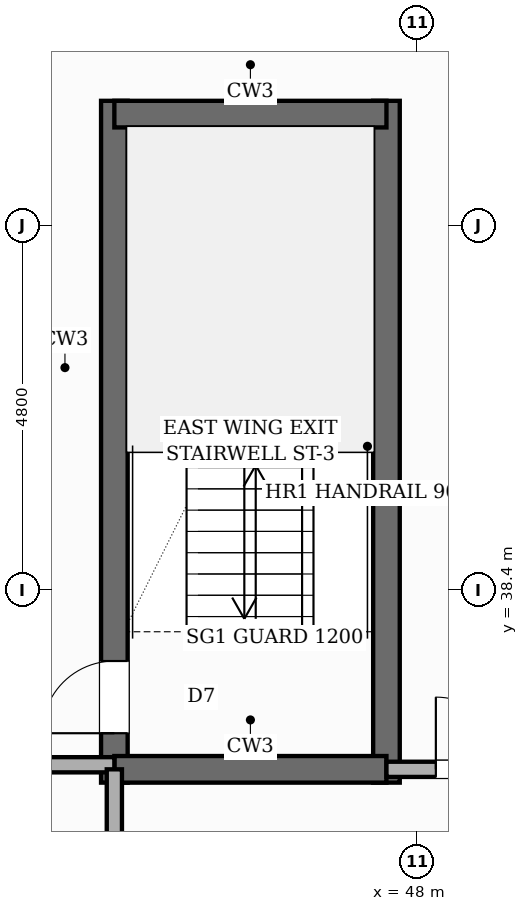
"""IFC4 building model, lengths in metres.
Left out: names, types, materials, properties, quantities, classifications, styles, units other than length and angle.
Written with IfcOpenShell. Run it as: python <this file> out.ifc"""

import sys

from ifc_helpers import new_model, si_unit, direction, frame, frame_2d, origin, place, context, subcontext, project, spatial, rectangle, extrude, element, fill, save


model = new_model("IFC4")
c1 = context("Model", 3, precision=1e-05, world=origin(), true_north=direction((0.0, 1.0)))
c2 = subcontext(c1, "Body", "Model", "MODEL_VIEW")
j1 = project(units=[si_unit("LENGTHUNIT", "METRE"), si_unit("PLANEANGLEUNIT", "RADIAN")], contexts=[c1])
p1 = place(None, origin())
s1 = spatial("IfcSite", under=j1, at=p1, CompositionType="ELEMENT")
p2 = place(p1, origin())
s2 = spatial("IfcBuilding", under=s1, at=p2, CompositionType="ELEMENT")
p3 = place(p2, frame((0.0, 0.0, 28.6)))
s3 = spatial("IfcBuildingStorey", under=s2, at=p3, CompositionType="ELEMENT", Elevation=28.6)
p4 = place(p3, frame((44.02, 35.865, 0.0), z_axis=(0.0, 0.0, 1.0), x_axis=(0.0, 1.0, 0.0)))
e1 = element("IfcWall", 1, at=p4, inside=s3, PredefinedType="SHEAR", context=c2, shape_type="SweptSolid", body=[
    extrude(rectangle(XDim=8.97, YDim=0.35, at=frame_2d((4.485, 0.0))), origin(), (0.0, 0.0, 1.0), 3.6),
])
p5 = place(p4, frame((0.65, 0.0, 0.0)))
e2 = element("IfcOpeningElement", 2, at=p5, cuts=e1, PredefinedType="OPENING", context=c2, shape_type="SweptSolid", body=[
    extrude(rectangle(XDim=0.95, YDim=2.1, at=frame_2d((0.475, 1.05))), frame((0.0, 0.185, 0.0), z_axis=(0.0, -1.0, 0.0), x_axis=(1.0, 0.0, 0.0)), (0.0, 0.0, 1.0), 0.37),
])
p6 = place(p3, frame((47.6, 35.865, 0.0), z_axis=(0.0, 0.0, 1.0), x_axis=(0.0, 1.0, 0.0)))
e3 = element("IfcWall", 3, at=p6, inside=s3, PredefinedType="SHEAR", context=c2, shape_type="SweptSolid", body=[
    extrude(rectangle(XDim=8.97, YDim=0.35, at=frame_2d((4.485, 0.0))), origin(), (0.0, 0.0, 1.0), 3.6),
])
for number, where, z_axis, x_axis in (
    (4, (44.02, 36.04, 0.0), (0.0, 0.0, 1.0), (1.0, 0.0, 0.0)),
    (5, (44.02, 44.66, 0.0), (0.0, 0.0, 1.0), (1.0, 0.0, 0.0)),
):
    element("IfcWall", number, at=place(p3, frame(where, z_axis=z_axis, x_axis=x_axis)), inside=s3, PredefinedType="SHEAR", context=c2, shape_type="SweptSolid", body=[
        extrude(rectangle(XDim=3.58, YDim=0.35, at=frame_2d((1.79, 0.0))), origin(), (0.0, 0.0, 1.0), 3.6),
    ])
p7 = place(p3, frame((22.75, 36.1, 0.0), z_axis=(0.0, 0.0, 1.0), x_axis=(1.0, 0.0, 0.0)))
e6 = element("IfcWall", 6, at=p7, inside=s3, PredefinedType="PARTITIONING", context=c2, shape_type="SweptSolid", body=[
    extrude(rectangle(XDim=21.27, YDim=0.2, at=frame_2d((10.635, 0.0))), origin(), (0.0, 0.0, 1.0), 3.35),
])
p8 = place(p7, frame((1.628, 0.0, 0.0)))
e7 = element("IfcOpeningElement", 7, at=p8, cuts=e6, PredefinedType="OPENING", context=c2, shape_type="SweptSolid", body=[
    extrude(rectangle(XDim=0.98, YDim=2.18, at=frame_2d((0.49, 1.09))), frame((0.0, 0.11, 0.0), z_axis=(0.0, -1.0, 0.0), x_axis=(1.0, 0.0, 0.0)), (0.0, 0.0, 1.0), 0.22),
])
p9 = place(p7, frame((14.725, 0.0, 0.0)))
e8 = element("IfcOpeningElement", 8, at=p9, cuts=e6, PredefinedType="OPENING", context=c2, shape_type="SweptSolid", body=[
    extrude(rectangle(XDim=0.98, YDim=2.18, at=frame_2d((0.49, 1.09))), frame((0.0, 0.11, 0.0), z_axis=(0.0, -1.0, 0.0), x_axis=(1.0, 0.0, 0.0)), (0.0, 0.0, 1.0), 0.22),
])
p10 = place(p3, frame((47.6, 36.04, 0.0), z_axis=(0.0, 0.0, 1.0), x_axis=(1.0, 0.0, 0.0)))
e9 = element("IfcWall", 9, at=p10, inside=s3, PredefinedType="PARTITIONING", context=c2, shape_type="SweptSolid", body=[
    extrude(rectangle(XDim=2.3, YDim=0.2, at=frame_2d((1.15, 0.0))), origin(), (0.0, 0.0, 1.0), 3.35),
])
p11 = place(p10, frame((0.65, 0.0, 0.0)))
e10 = element("IfcOpeningElement", 10, at=p11, cuts=e9, PredefinedType="OPENING", context=c2, shape_type="SweptSolid", body=[
    extrude(rectangle(XDim=0.95, YDim=2.15, at=frame_2d((0.475, 1.075))), frame((0.0, 0.11, 0.0), z_axis=(0.0, -1.0, 0.0), x_axis=(1.0, 0.0, 0.0)), (0.0, 0.0, 1.0), 0.22),
])
p12 = place(p3, frame((44.02, 29.12, 0.0), z_axis=(0.0, 0.0, 1.0), x_axis=(0.0, 1.0, 0.0)))
e11 = element("IfcWall", 11, at=p12, inside=s3, PredefinedType="SOLIDWALL", context=c2, shape_type="SweptSolid", body=[
    extrude(rectangle(XDim=6.92, YDim=0.2, at=frame_2d((3.46, 0.0))), origin(), (0.0, 0.0, 1.0), 3.35),
])
p13 = place(p5, origin())
e12 = element("IfcDoor", 12, at=p13, inside=s3, OperationType="SINGLE_SWING_LEFT", PredefinedType="DOOR", context=c2, shape_type="SweptSolid", body=[
    extrude(rectangle(XDim=0.95, YDim=2.1, at=frame_2d((0.475, 1.05))), frame((0.0, 0.025, 0.0), z_axis=(0.0, -1.0, 0.0), x_axis=(1.0, 0.0, 0.0)), (0.0, 0.0, 1.0), 0.05),
])
fill(e2, e12)
p14 = place(p11, origin())
e13 = element("IfcDoor", 13, at=p14, inside=s3, OperationType="SINGLE_SWING_LEFT", PredefinedType="DOOR", context=c2, shape_type="SweptSolid", body=[
    extrude(rectangle(XDim=0.95, YDim=2.15, at=frame_2d((0.475, 1.075))), frame((0.0, 0.025, 0.0), z_axis=(0.0, -1.0, 0.0), x_axis=(1.0, 0.0, 0.0)), (0.0, 0.0, 1.0), 0.05),
])
fill(e10, e13)
save(model, sys.argv[1])
